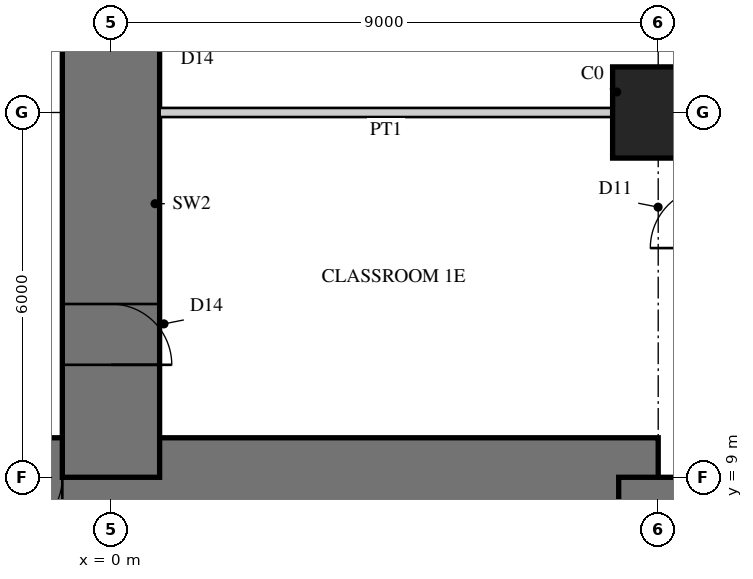
"""IFC4 building model, lengths in metres.
Left out: names, types, materials, properties, quantities, classifications, styles, units other than length and angle.
Written with IfcOpenShell. Run it as: python <this file> out.ifc"""

import sys

from ifc_helpers import new_model, si_unit, direction, frame, frame_2d, origin, origin_2d, place, context, subcontext, project, spatial, rectangle, extrude, element, fill, save


model = new_model("IFC4")
c1 = context("Model", 3, precision=1e-05, world=origin(), true_north=direction((0.0, 1.0)))
c2 = subcontext(c1, "Body", "Model", "MODEL_VIEW")
j1 = project(units=[si_unit("LENGTHUNIT", "METRE"), si_unit("PLANEANGLEUNIT", "RADIAN")], contexts=[c1])
p1 = place(None, origin())
s1 = spatial("IfcSite", under=j1, at=p1, CompositionType="ELEMENT")
p2 = place(p1, origin())
s2 = spatial("IfcBuilding", under=s1, at=p2, CompositionType="ELEMENT")
p3 = place(p2, frame((0.0, 0.0, 5.0)))
s3 = spatial("IfcBuildingStorey", under=s2, at=p3, CompositionType="ELEMENT", Elevation=5.0)
p4 = place(p3, frame((9.0, 9.0, 0.0), z_axis=(0.0, 0.0, 1.0), x_axis=(-1.0, 0.0, 0.0)))
e1 = element("IfcWall", 1, at=p4, inside=s3, PredefinedType="SHEAR", context=c2, shape_type="SweptSolid", body=[
    extrude(rectangle(XDim=18.0, YDim=1.3, at=frame_2d((9.0, 0.0))), origin(), (0.0, 0.0, 1.0), 4.5),
])
p5 = place(p4, frame((9.8, 0.0, 0.0)))
e2 = element("IfcOpeningElement", 2, at=p5, cuts=e1, PredefinedType="OPENING", context=c2, shape_type="SweptSolid", body=[
    extrude(rectangle(XDim=1.0, YDim=2.4, at=frame_2d((0.5, 1.2))), frame((0.0, 0.66, 0.0), z_axis=(0.0, -1.0, 0.0), x_axis=(1.0, 0.0, 0.0)), (0.0, 0.0, 1.0), 1.32),
])
p6 = place(p3, frame((9.0, -9.0, 0.0), z_axis=(0.0, 0.0, 1.0), x_axis=(0.0, 1.0, 0.0)))
e3 = element("IfcWall", 3, at=p6, inside=s3, PredefinedType="SHEAR", context=c2, shape_type="SweptSolid", body=[
    extrude(rectangle(XDim=18.0, YDim=1.3, at=frame_2d((9.0, 0.0))), origin(), (0.0, 0.0, 1.0), 4.5),
])
p7 = place(p6, frame((9.8, 0.0, 0.0)))
e4 = element("IfcOpeningElement", 4, at=p7, cuts=e3, PredefinedType="OPENING", context=c2, shape_type="SweptSolid", body=[
    extrude(rectangle(XDim=1.0, YDim=2.4, at=frame_2d((0.5, 1.2))), frame((0.0, 0.66, 0.0), z_axis=(0.0, -1.0, 0.0), x_axis=(1.0, 0.0, 0.0)), (0.0, 0.0, 1.0), 1.32),
])
p8 = place(p3, frame((0.0, 9.0, 0.0), z_axis=(0.0, 0.0, 1.0), x_axis=(0.0, 1.0, 0.0)))
e5 = element("IfcWall", 5, at=p8, inside=s3, PredefinedType="SHEAR", context=c2, shape_type="SweptSolid", body=[
    extrude(rectangle(XDim=9.0, YDim=1.6, at=frame_2d((4.5, 0.0))), origin(), (0.0, 0.0, 1.0), 4.5),
])
p9 = place(p8, frame((1.85, 0.0, 0.0)))
e6 = element("IfcOpeningElement", 6, at=p9, cuts=e5, PredefinedType="OPENING", context=c2, shape_type="SweptSolid", body=[
    extrude(rectangle(XDim=1.0, YDim=2.2, at=frame_2d((0.5, 1.1))), frame((0.0, 0.81, 0.0), z_axis=(0.0, -1.0, 0.0), x_axis=(1.0, 0.0, 0.0)), (0.0, 0.0, 1.0), 1.62),
])
p10 = place(p8, frame((7.2, 0.0, 0.0)))
e7 = element("IfcOpeningElement", 7, at=p10, cuts=e5, PredefinedType="OPENING", context=c2, shape_type="SweptSolid", body=[
    extrude(rectangle(XDim=1.0, YDim=2.2, at=frame_2d((0.5, 1.1))), frame((0.0, 0.81, 0.0), z_axis=(0.0, -1.0, 0.0), x_axis=(1.0, 0.0, 0.0)), (0.0, 0.0, 1.0), 1.62),
])
p11 = place(p3, frame((9.0, 15.0, 0.0), z_axis=(0.0, 0.0, 1.0), x_axis=(1.0, 0.0, 0.0)))
e8 = element("IfcColumn", 8, at=p11, inside=s3, PredefinedType="COLUMN", context=c2, shape_type="SweptSolid", body=[
    extrude(rectangle(XDim=1.5, YDim=1.5, at=origin_2d()), origin(), (0.0, 0.0, 1.0), 4.5),
])
p12 = place(p3, frame((8.25, 15.0, 0.0), z_axis=(0.0, 0.0, 1.0), x_axis=(-1.0, 0.0, 0.0)))
e9 = element("IfcWall", 9, at=p12, inside=s3, PredefinedType="PARTITIONING", context=c2, shape_type="SweptSolid", body=[
    extrude(rectangle(XDim=7.45, YDim=0.15, at=frame_2d((3.725, 0.0))), origin(), (0.0, 0.0, 1.0), 3.35),
])
p13 = place(p9, frame((1.0, 0.0, 0.0), z_axis=(0.0, 0.0, 1.0), x_axis=(-1.0, 0.0, 0.0)))
e10 = element("IfcDoor", 10, at=p13, inside=s3, OperationType="SINGLE_SWING_RIGHT", PredefinedType="DOOR", context=c2, shape_type="SweptSolid", body=[
    extrude(rectangle(XDim=1.0, YDim=2.2, at=frame_2d((0.5, 1.1))), frame((0.0, 0.025, 0.0), z_axis=(0.0, -1.0, 0.0), x_axis=(1.0, 0.0, 0.0)), (0.0, 0.0, 1.0), 0.05),
])
fill(e6, e10)
p14 = place(p5, origin())
e11 = element("IfcDoor", 11, at=p14, inside=s3, OperationType="SINGLE_SWING_RIGHT", PredefinedType="DOOR", context=c2, shape_type="SweptSolid", body=[
    extrude(rectangle(XDim=1.0, YDim=2.4, at=frame_2d((0.5, 1.2))), frame((0.0, 0.055, 0.0), z_axis=(0.0, -1.0, 0.0), x_axis=(1.0, 0.0, 0.0)), (0.0, 0.0, 1.0), 0.05),
])
fill(e2, e11)
save(model, sys.argv[1])
